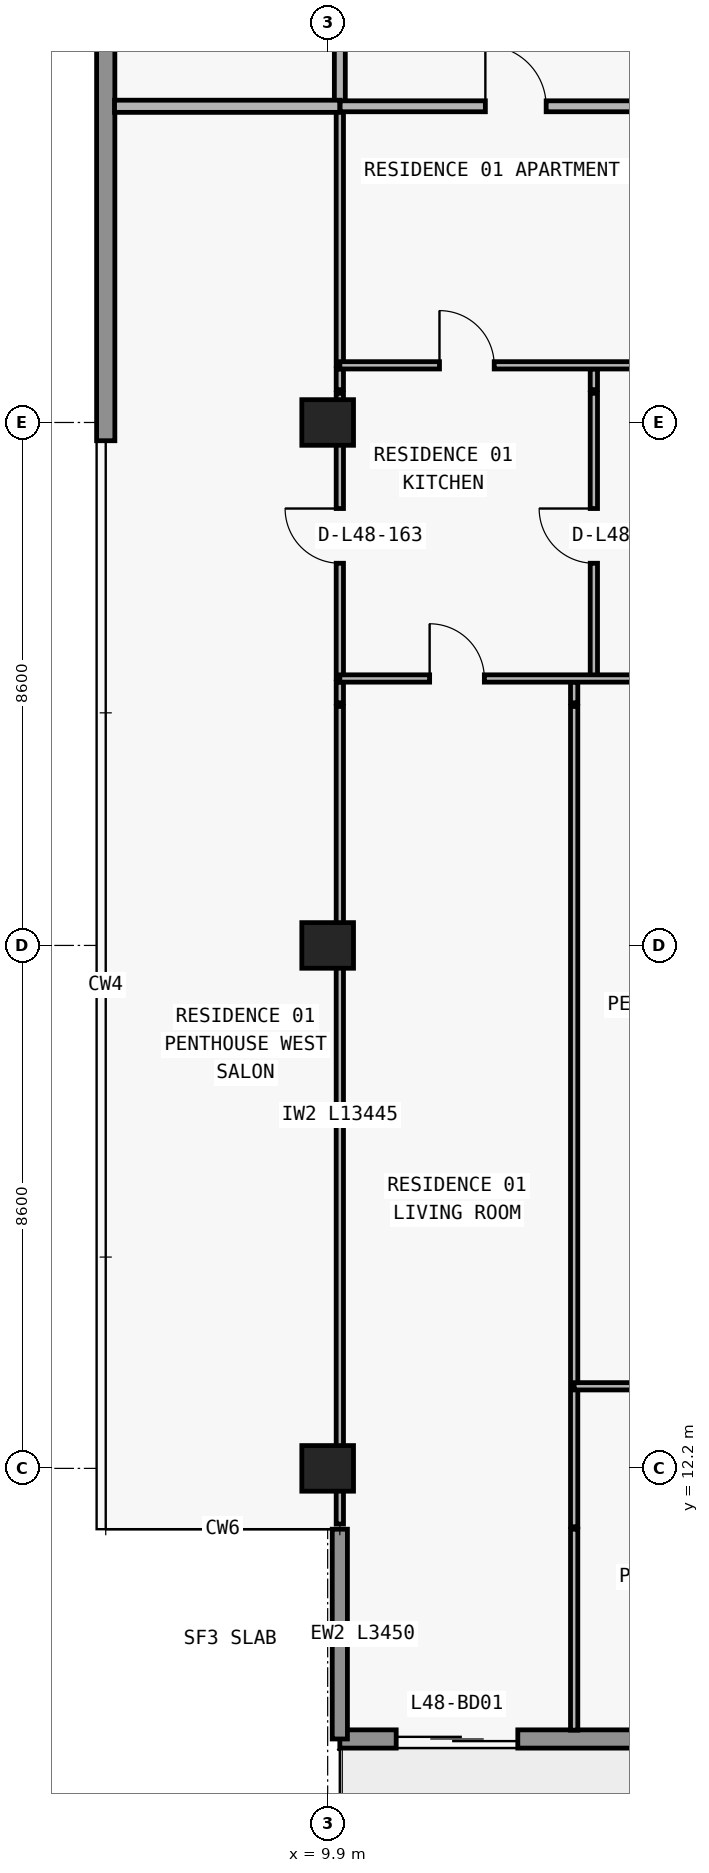
"""IFC4 building model, lengths in metres.
Left out: names, types, materials, properties, quantities, classifications, styles, units other than length and angle.
Written with IfcOpenShell. Run it as: python <this file> out.ifc"""

import sys

from ifc_helpers import new_model, si_unit, direction, frame, frame_2d, origin, origin_2d, place, context, subcontext, project, spatial, rectangle, extrude, element, fill, save


model = new_model("IFC4")
c1 = context("Model", 3, precision=1e-05, world=origin(), true_north=direction((0.0, 1.0)))
c2 = subcontext(c1, "Body", "Model", "MODEL_VIEW")
j1 = project(units=[si_unit("LENGTHUNIT", "METRE"), si_unit("PLANEANGLEUNIT", "RADIAN")], contexts=[c1])
p1 = place(None, origin())
s1 = spatial("IfcSite", under=j1, at=p1, CompositionType="ELEMENT")
p2 = place(p1, origin())
s2 = spatial("IfcBuilding", under=s1, at=p2, CompositionType="ELEMENT")
p3 = place(p2, frame((0.0, 0.0, 173.7)))
s3 = spatial("IfcBuildingStorey", under=s2, at=p3, CompositionType="ELEMENT", Elevation=173.7)
for number, where, z_axis, x_axis in (
    (1, (9.9, 12.2, 0.0), (0.0, 0.0, 1.0), (1.0, 0.0, 0.0)),
    (2, (9.9, 20.8, 0.0), (0.0, 0.0, 1.0), (1.0, 0.0, 0.0)),
    (3, (9.9, 29.4, 0.0), (0.0, 0.0, 1.0), (1.0, 0.0, 0.0)),
):
    element("IfcColumn", number, at=place(p3, frame(where, z_axis=z_axis, x_axis=x_axis)), inside=s3, PredefinedType="COLUMN", context=c2, shape_type="SweptSolid", body=[
        extrude(rectangle(XDim=0.85, YDim=0.75, at=origin_2d()), origin(), (0.0, 0.0, 1.0), 3.05),
    ])
p4 = place(p3, frame((67.7, 7.75, 0.0), z_axis=(0.0, 0.0, 1.0), x_axis=(-1.0, 0.0, 0.0)))
e4 = element("IfcWall", 4, at=p4, inside=s3, PredefinedType="STANDARD", context=c2, shape_type="SweptSolid", body=[
    extrude(rectangle(XDim=57.6, YDim=0.3, at=frame_2d((28.8, 0.0))), origin(), (0.0, 0.0, 1.0), 3.05),
])
p5 = place(p4, frame((54.673, 0.0, 0.0)))
e5 = element("IfcOpeningElement", 5, at=p5, cuts=e4, PredefinedType="OPENING", context=c2, shape_type="SweptSolid", body=[
    extrude(rectangle(XDim=2.0, YDim=2.3, at=frame_2d((1.0, 1.15))), frame((0.0, 0.16, 0.0), z_axis=(0.0, -1.0, 0.0), x_axis=(1.0, 0.0, 0.0)), (0.0, 0.0, 1.0), 0.32),
])
p6 = place(p4, frame((50.473, 0.0, 0.85)))
e6 = element("IfcOpeningElement", 6, at=p6, cuts=e4, PredefinedType="OPENING", context=c2, shape_type="SweptSolid", body=[
    extrude(rectangle(XDim=2.2, YDim=1.55, at=frame_2d((1.1, 0.775))), frame((0.0, 0.16, 0.0), z_axis=(0.0, -1.0, 0.0), x_axis=(1.0, 0.0, 0.0)), (0.0, 0.0, 1.0), 0.32),
])
p7 = place(p4, frame((46.09, 0.0, 0.0)))
e7 = element("IfcOpeningElement", 7, at=p7, cuts=e4, PredefinedType="OPENING", context=c2, shape_type="SweptSolid", body=[
    extrude(rectangle(XDim=2.0, YDim=2.3, at=frame_2d((1.0, 1.15))), frame((0.0, 0.16, 0.0), z_axis=(0.0, -1.0, 0.0), x_axis=(1.0, 0.0, 0.0)), (0.0, 0.0, 1.0), 0.32),
])
p8 = place(p4, frame((41.99, 0.0, 0.85)))
e8 = element("IfcOpeningElement", 8, at=p8, cuts=e4, PredefinedType="OPENING", context=c2, shape_type="SweptSolid", body=[
    extrude(rectangle(XDim=1.8, YDim=1.55, at=frame_2d((0.9, 0.775))), frame((0.0, 0.16, 0.0), z_axis=(0.0, -1.0, 0.0), x_axis=(1.0, 0.0, 0.0)), (0.0, 0.0, 1.0), 0.32),
])
p9 = place(p4, frame((38.09, 0.0, 0.0)))
e9 = element("IfcOpeningElement", 9, at=p9, cuts=e4, PredefinedType="OPENING", context=c2, shape_type="SweptSolid", body=[
    extrude(rectangle(XDim=2.0, YDim=2.3, at=frame_2d((1.0, 1.15))), frame((0.0, 0.16, 0.0), z_axis=(0.0, -1.0, 0.0), x_axis=(1.0, 0.0, 0.0)), (0.0, 0.0, 1.0), 0.32),
])
p10 = place(p4, frame((33.41, 0.0, 0.65)))
e10 = element("IfcOpeningElement", 10, at=p10, cuts=e4, PredefinedType="OPENING", context=c2, shape_type="SweptSolid", body=[
    extrude(rectangle(XDim=2.6, YDim=1.85, at=frame_2d((1.3, 0.925))), frame((0.0, 0.16, 0.0), z_axis=(0.0, -1.0, 0.0), x_axis=(1.0, 0.0, 0.0)), (0.0, 0.0, 1.0), 0.32),
])
p11 = place(p4, frame((27.7, 0.0, 0.85)))
e11 = element("IfcOpeningElement", 11, at=p11, cuts=e4, PredefinedType="OPENING", context=c2, shape_type="SweptSolid", body=[
    extrude(rectangle(XDim=2.2, YDim=1.55, at=frame_2d((1.1, 0.775))), frame((0.0, 0.16, 0.0), z_axis=(0.0, -1.0, 0.0), x_axis=(1.0, 0.0, 0.0)), (0.0, 0.0, 1.0), 0.32),
])
p12 = place(p4, frame((19.7, 0.0, 0.85)))
e12 = element("IfcOpeningElement", 12, at=p12, cuts=e4, PredefinedType="OPENING", context=c2, shape_type="SweptSolid", body=[
    extrude(rectangle(XDim=2.2, YDim=1.55, at=frame_2d((1.1, 0.775))), frame((0.0, 0.16, 0.0), z_axis=(0.0, -1.0, 0.0), x_axis=(1.0, 0.0, 0.0)), (0.0, 0.0, 1.0), 0.32),
])
p13 = place(p4, frame((13.29, 0.0, 0.0)))
e13 = element("IfcOpeningElement", 13, at=p13, cuts=e4, PredefinedType="OPENING", context=c2, shape_type="SweptSolid", body=[
    extrude(rectangle(XDim=2.0, YDim=2.3, at=frame_2d((1.0, 1.15))), frame((0.0, 0.16, 0.0), z_axis=(0.0, -1.0, 0.0), x_axis=(1.0, 0.0, 0.0)), (0.0, 0.0, 1.0), 0.32),
])
p14 = place(p4, frame((9.19, 0.0, 0.85)))
e14 = element("IfcOpeningElement", 14, at=p14, cuts=e4, PredefinedType="OPENING", context=c2, shape_type="SweptSolid", body=[
    extrude(rectangle(XDim=1.8, YDim=1.55, at=frame_2d((0.9, 0.775))), frame((0.0, 0.16, 0.0), z_axis=(0.0, -1.0, 0.0), x_axis=(1.0, 0.0, 0.0)), (0.0, 0.0, 1.0), 0.32),
])
p15 = place(p4, frame((5.273, 0.0, 0.0)))
e15 = element("IfcOpeningElement", 15, at=p15, cuts=e4, PredefinedType="OPENING", context=c2, shape_type="SweptSolid", body=[
    extrude(rectangle(XDim=2.0, YDim=2.3, at=frame_2d((1.0, 1.15))), frame((0.0, 0.16, 0.0), z_axis=(0.0, -1.0, 0.0), x_axis=(1.0, 0.0, 0.0)), (0.0, 0.0, 1.0), 0.32),
])
p16 = place(p4, frame((1.073, 0.0, 0.85)))
e16 = element("IfcOpeningElement", 16, at=p16, cuts=e4, PredefinedType="OPENING", context=c2, shape_type="SweptSolid", body=[
    extrude(rectangle(XDim=2.2, YDim=1.55, at=frame_2d((1.1, 0.775))), frame((0.0, 0.16, 0.0), z_axis=(0.0, -1.0, 0.0), x_axis=(1.0, 0.0, 0.0)), (0.0, 0.0, 1.0), 0.32),
])
p17 = place(p3, frame((10.1, 11.2, 0.0), z_axis=(0.0, 0.0, 1.0), x_axis=(0.0, -1.0, 0.0)))
e17 = element("IfcWall", 17, at=p17, inside=s3, PredefinedType="ELEMENTEDWALL", context=c2, shape_type="SweptSolid", body=[
    extrude(rectangle(XDim=3.45, YDim=0.25, at=frame_2d((1.725, 0.0))), origin(), (0.0, 0.0, 1.0), 3.05),
])
p18 = place(p3, frame((6.25, 29.1, 0.0), z_axis=(0.0, 0.0, 1.0), x_axis=(0.0, 1.0, 0.0)))
e18 = element("IfcWall", 18, at=p18, inside=s3, PredefinedType="STANDARD", context=c2, shape_type="SweptSolid", body=[
    extrude(rectangle(XDim=17.9, YDim=0.3, at=frame_2d((8.95, 0.0))), origin(), (0.0, 0.0, 1.0), 3.05),
])
p19 = place(p3, frame((10.1, 11.285, 0.0), z_axis=(0.0, 0.0, 1.0), x_axis=(0.0, 1.0, 0.0)))
e19 = element("IfcWall", 19, at=p19, inside=s3, PredefinedType="PARTITIONING", context=c2, shape_type="SweptSolid", body=[
    extrude(rectangle(XDim=13.445, YDim=0.12, at=frame_2d((6.723, 0.0))), origin(), (0.0, 0.0, 1.0), 2.263),
])
p20 = place(p3, frame((10.1, 24.79, 0.0), z_axis=(0.0, 0.0, 1.0), x_axis=(0.0, 1.0, 0.0)))
e20 = element("IfcWall", 20, at=p20, inside=s3, PredefinedType="PARTITIONING", context=c2, shape_type="SweptSolid", body=[
    extrude(rectangle(XDim=0.34, YDim=0.12, at=frame_2d((0.17, 0.0))), origin(), (0.0, 0.0, 1.0), 2.263),
])
p21 = place(p3, frame((10.1, 25.19, 0.0), z_axis=(0.0, 0.0, 1.0), x_axis=(0.0, 1.0, 0.0)))
e21 = element("IfcWall", 21, at=p21, inside=s3, PredefinedType="PARTITIONING", context=c2, shape_type="SweptSolid", body=[
    extrude(rectangle(XDim=4.69, YDim=0.12, at=frame_2d((2.345, 0.0))), origin(), (0.0, 0.0, 1.0), 2.263),
])
p22 = place(p21, frame((1.895, 0.0, 0.0)))
e22 = element("IfcOpeningElement", 22, at=p22, cuts=e21, PredefinedType="OPENING", context=c2, shape_type="SweptSolid", body=[
    extrude(rectangle(XDim=0.9, YDim=2.15, at=frame_2d((0.45, 1.075))), frame((0.0, 0.07, 0.0), z_axis=(0.0, -1.0, 0.0), x_axis=(1.0, 0.0, 0.0)), (0.0, 0.0, 1.0), 0.14),
])
p23 = place(p3, frame((10.1, 29.94, 0.0), z_axis=(0.0, 0.0, 1.0), x_axis=(0.0, 1.0, 0.0)))
e23 = element("IfcWall", 23, at=p23, inside=s3, PredefinedType="PARTITIONING", context=c2, shape_type="SweptSolid", body=[
    extrude(rectangle(XDim=0.34, YDim=0.12, at=frame_2d((0.17, 0.0))), origin(), (0.0, 0.0, 1.0), 2.263),
])
p24 = place(p3, frame((10.1, 30.34, 0.0), z_axis=(0.0, 0.0, 1.0), x_axis=(0.0, 1.0, 0.0)))
e24 = element("IfcWall", 24, at=p24, inside=s3, PredefinedType="PARTITIONING", context=c2, shape_type="SweptSolid", body=[
    extrude(rectangle(XDim=4.26, YDim=0.12, at=frame_2d((2.13, 0.0))), origin(), (0.0, 0.0, 1.0), 2.263),
])
p25 = place(p3, frame((10.1, 34.605, 0.0), z_axis=(0.0, 0.0, 1.0), x_axis=(0.0, 1.0, 0.0)))
e25 = element("IfcWall", 25, at=p25, inside=s3, PredefinedType="PARTITIONING", context=c2, shape_type="SweptSolid", body=[
    extrude(rectangle(XDim=2.345, YDim=0.18, at=frame_2d((1.172, 0.0))), origin(), (0.0, 0.0, 1.0), 2.263),
])
p26 = place(p3, frame((13.954, 7.895, 0.0), z_axis=(0.0, 0.0, 1.0), x_axis=(0.0, 1.0, 0.0)))
e26 = element("IfcWall", 26, at=p26, inside=s3, PredefinedType="PARTITIONING", context=c2, shape_type="SweptSolid", body=[
    extrude(rectangle(XDim=3.305, YDim=0.12, at=frame_2d((1.652, 0.0))), origin(), (0.0, 0.0, 1.0), 3.05),
])
p27 = place(p3, frame((13.954, 11.24, 0.0), z_axis=(0.0, 0.0, 1.0), x_axis=(0.0, 1.0, 0.0)))
e27 = element("IfcWall", 27, at=p27, inside=s3, PredefinedType="PARTITIONING", context=c2, shape_type="SweptSolid", body=[
    extrude(rectangle(XDim=13.49, YDim=0.12, at=frame_2d((6.745, 0.0))), origin(), (0.0, 0.0, 1.0), 3.05),
])
p28 = place(p3, frame((13.954, 24.79, 0.0), z_axis=(0.0, 0.0, 1.0), x_axis=(0.0, 1.0, 0.0)))
e28 = element("IfcWall", 28, at=p28, inside=s3, PredefinedType="PARTITIONING", context=c2, shape_type="SweptSolid", body=[
    extrude(rectangle(XDim=0.34, YDim=0.12, at=frame_2d((0.17, 0.0))), origin(), (0.0, 0.0, 1.0), 3.05),
])
p29 = place(p3, frame((14.278, 25.19, 0.0), z_axis=(0.0, 0.0, 1.0), x_axis=(0.0, 1.0, 0.0)))
e29 = element("IfcWall", 29, at=p29, inside=s3, PredefinedType="PARTITIONING", context=c2, shape_type="SweptSolid", body=[
    extrude(rectangle(XDim=4.69, YDim=0.12, at=frame_2d((2.345, 0.0))), origin(), (0.0, 0.0, 1.0), 3.05),
])
p30 = place(p29, frame((1.895, 0.0, 0.0)))
e30 = element("IfcOpeningElement", 30, at=p30, cuts=e29, PredefinedType="OPENING", context=c2, shape_type="SweptSolid", body=[
    extrude(rectangle(XDim=0.9, YDim=2.15, at=frame_2d((0.45, 1.075))), frame((0.0, 0.07, 0.0), z_axis=(0.0, -1.0, 0.0), x_axis=(1.0, 0.0, 0.0)), (0.0, 0.0, 1.0), 0.14),
])
p31 = place(p3, frame((14.278, 29.94, 0.0), z_axis=(0.0, 0.0, 1.0), x_axis=(0.0, 1.0, 0.0)))
e31 = element("IfcWall", 31, at=p31, inside=s3, PredefinedType="PARTITIONING", context=c2, shape_type="SweptSolid", body=[
    extrude(rectangle(XDim=0.34, YDim=0.12, at=frame_2d((0.17, 0.0))), origin(), (0.0, 0.0, 1.0), 3.05),
])
p32 = place(p3, frame((13.954, 13.55, 0.0), z_axis=(0.0, 0.0, 1.0), x_axis=(1.0, 0.0, 0.0)))
e32 = element("IfcWall", 32, at=p32, inside=s3, PredefinedType="PARTITIONING", context=c2, shape_type="SweptSolid", body=[
    extrude(rectangle(XDim=4.296, YDim=0.12, at=frame_2d((2.148, 0.0))), origin(), (0.0, 0.0, 1.0), 3.05),
])
p33 = place(p32, frame((1.698, 0.0, 0.0)))
e33 = element("IfcOpeningElement", 33, at=p33, cuts=e32, PredefinedType="OPENING", context=c2, shape_type="SweptSolid", body=[
    extrude(rectangle(XDim=0.9, YDim=2.15, at=frame_2d((0.45, 1.075))), frame((0.0, 0.07, 0.0), z_axis=(0.0, -1.0, 0.0), x_axis=(1.0, 0.0, 0.0)), (0.0, 0.0, 1.0), 0.14),
])
p34 = place(p3, frame((10.1, 25.19, 0.0), z_axis=(0.0, 0.0, 1.0), x_axis=(1.0, 0.0, 0.0)))
e34 = element("IfcWall", 34, at=p34, inside=s3, PredefinedType="PARTITIONING", context=c2, shape_type="SweptSolid", body=[
    extrude(rectangle(XDim=8.15, YDim=0.12, at=frame_2d((4.075, 0.0))), origin(), (0.0, 0.0, 1.0), 3.05),
])
p35 = place(p34, frame((1.477, 0.0, 0.0)))
e35 = element("IfcOpeningElement", 35, at=p35, cuts=e34, PredefinedType="OPENING", context=c2, shape_type="SweptSolid", body=[
    extrude(rectangle(XDim=0.9, YDim=2.15, at=frame_2d((0.45, 1.075))), frame((0.0, 0.07, 0.0), z_axis=(0.0, -1.0, 0.0), x_axis=(1.0, 0.0, 0.0)), (0.0, 0.0, 1.0), 0.14),
])
p36 = place(p34, frame((5.714, 0.0, 0.0)))
e36 = element("IfcOpeningElement", 36, at=p36, cuts=e34, PredefinedType="OPENING", context=c2, shape_type="SweptSolid", body=[
    extrude(rectangle(XDim=0.9, YDim=2.15, at=frame_2d((0.45, 1.075))), frame((0.0, 0.07, 0.0), z_axis=(0.0, -1.0, 0.0), x_axis=(1.0, 0.0, 0.0)), (0.0, 0.0, 1.0), 0.14),
])
p37 = place(p3, frame((10.1, 30.34, 0.0), z_axis=(0.0, 0.0, 1.0), x_axis=(1.0, 0.0, 0.0)))
e37 = element("IfcWall", 37, at=p37, inside=s3, PredefinedType="PARTITIONING", context=c2, shape_type="SweptSolid", body=[
    extrude(rectangle(XDim=8.15, YDim=0.12, at=frame_2d((4.075, 0.0))), origin(), (0.0, 0.0, 1.0), 3.05),
])
p38 = place(p37, frame((1.639, 0.0, 0.0)))
e38 = element("IfcOpeningElement", 38, at=p38, cuts=e37, PredefinedType="OPENING", context=c2, shape_type="SweptSolid", body=[
    extrude(rectangle(XDim=0.9, YDim=2.15, at=frame_2d((0.45, 1.075))), frame((0.0, 0.07, 0.0), z_axis=(0.0, -1.0, 0.0), x_axis=(1.0, 0.0, 0.0)), (0.0, 0.0, 1.0), 0.14),
])
p39 = place(p3, frame((6.395, 34.6, 0.0), z_axis=(0.0, 0.0, 1.0), x_axis=(1.0, 0.0, 0.0)))
e39 = element("IfcWall", 39, at=p39, inside=s3, PredefinedType="PARTITIONING", context=c2, shape_type="SweptSolid", body=[
    extrude(rectangle(XDim=3.705, YDim=0.2, at=frame_2d((1.853, 0.0))), origin(), (0.0, 0.0, 1.0), 3.05),
])
p40 = place(p3, frame((10.105, 34.6, 0.0), z_axis=(0.0, 0.0, 1.0), x_axis=(1.0, 0.0, 0.0)))
e40 = element("IfcWall", 40, at=p40, inside=s3, PredefinedType="PARTITIONING", context=c2, shape_type="SweptSolid", body=[
    extrude(rectangle(XDim=8.145, YDim=0.18, at=frame_2d((4.073, 0.0))), origin(), (0.0, 0.0, 1.0), 3.05),
])
p41 = place(p40, frame((2.388, 0.0, 0.0)))
e41 = element("IfcOpeningElement", 41, at=p41, cuts=e40, PredefinedType="OPENING", context=c2, shape_type="SweptSolid", body=[
    extrude(rectangle(XDim=1.0, YDim=2.2, at=frame_2d((0.5, 1.1))), frame((0.0, 0.1, 0.0), z_axis=(0.0, -1.0, 0.0), x_axis=(1.0, 0.0, 0.0)), (0.0, 0.0, 1.0), 0.2),
])
p42 = place(p5, origin())
e42 = element("IfcDoor", 42, at=p42, inside=s3, OperationType="DOUBLE_DOOR_SLIDING", PredefinedType="DOOR", context=c2, shape_type="SweptSolid", body=[
    extrude(rectangle(XDim=2.0, YDim=2.3, at=frame_2d((1.0, 1.15))), frame((0.0, 0.025, 0.0), z_axis=(0.0, -1.0, 0.0), x_axis=(1.0, 0.0, 0.0)), (0.0, 0.0, 1.0), 0.05),
])
fill(e5, e42)
p43 = place(p41, origin())
e43 = element("IfcDoor", 43, at=p43, inside=s3, OperationType="SINGLE_SWING_LEFT", PredefinedType="DOOR", context=c2, shape_type="SweptSolid", body=[
    extrude(rectangle(XDim=1.0, YDim=2.2, at=frame_2d((0.5, 1.1))), frame((0.0, 0.025, 0.0), z_axis=(0.0, -1.0, 0.0), x_axis=(1.0, 0.0, 0.0)), (0.0, 0.0, 1.0), 0.05),
])
fill(e41, e43)
p44 = place(p38, origin())
e44 = element("IfcDoor", 44, at=p44, inside=s3, OperationType="SINGLE_SWING_LEFT", PredefinedType="DOOR", context=c2, shape_type="SweptSolid", body=[
    extrude(rectangle(XDim=0.9, YDim=2.15, at=frame_2d((0.45, 1.075))), frame((0.0, 0.025, 0.0), z_axis=(0.0, -1.0, 0.0), x_axis=(1.0, 0.0, 0.0)), (0.0, 0.0, 1.0), 0.05),
])
fill(e38, e44)
p45 = place(p30, origin())
e45 = element("IfcDoor", 45, at=p45, inside=s3, OperationType="SINGLE_SWING_RIGHT", PredefinedType="DOOR", context=c2, shape_type="SweptSolid", body=[
    extrude(rectangle(XDim=0.9, YDim=2.15, at=frame_2d((0.45, 1.075))), frame((0.0, 0.025, 0.0), z_axis=(0.0, -1.0, 0.0), x_axis=(1.0, 0.0, 0.0)), (0.0, 0.0, 1.0), 0.05),
])
fill(e30, e45)
p46 = place(p35, origin())
e46 = element("IfcDoor", 46, at=p46, inside=s3, OperationType="SINGLE_SWING_LEFT", PredefinedType="DOOR", context=c2, shape_type="SweptSolid", body=[
    extrude(rectangle(XDim=0.9, YDim=2.15, at=frame_2d((0.45, 1.075))), frame((0.0, 0.025, 0.0), z_axis=(0.0, -1.0, 0.0), x_axis=(1.0, 0.0, 0.0)), (0.0, 0.0, 1.0), 0.05),
])
fill(e35, e46)
p47 = place(p22, origin())
e47 = element("IfcDoor", 47, at=p47, inside=s3, OperationType="SINGLE_SWING_RIGHT", PredefinedType="DOOR", context=c2, shape_type="SweptSolid", body=[
    extrude(rectangle(XDim=0.9, YDim=2.15, at=frame_2d((0.45, 1.075))), frame((0.0, 0.025, 0.0), z_axis=(0.0, -1.0, 0.0), x_axis=(1.0, 0.0, 0.0)), (0.0, 0.0, 1.0), 0.05),
])
fill(e22, e47)
save(model, sys.argv[1])
